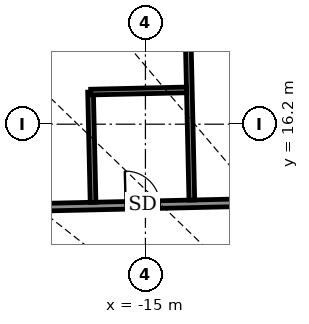
"""IFC4 building model, lengths in metres.
Left out: names, types, materials, properties, quantities, classifications, styles, units other than length and angle.
Written with IfcOpenShell. Run it as: python <this file> out.ifc"""

import sys

from ifc_helpers import new_model, si_unit, direction, frame, frame_2d, origin, place, context, subcontext, project, spatial, rectangle, extrude, element, fill, save


model = new_model("IFC4")
c1 = context("Model", 3, precision=1e-05, world=origin(), true_north=direction((0.0, 1.0)))
c2 = subcontext(c1, "Body", "Model", "MODEL_VIEW")
j1 = project(units=[si_unit("LENGTHUNIT", "METRE"), si_unit("PLANEANGLEUNIT", "RADIAN")], contexts=[c1])
p1 = place(None, origin())
s1 = spatial("IfcSite", under=j1, at=p1, CompositionType="ELEMENT")
p2 = place(p1, origin())
s2 = spatial("IfcBuilding", under=s1, at=p2, CompositionType="ELEMENT")
p3 = place(p2, frame((0.0, 0.0, 74.7)))
s3 = spatial("IfcBuildingStorey", under=s2, at=p3, CompositionType="ELEMENT", Elevation=74.7)
p4 = place(p3, frame((-25.525, 13.838, 0.0), z_axis=(0.0, 0.0, 1.0), x_axis=(0.999742549888, 0.022689952476, 0.0)))
e1 = element("IfcWall", 1, at=p4, inside=s3, PredefinedType="PARTITIONING", context=c2, shape_type="SweptSolid", body=[
    extrude(rectangle(XDim=53.778, YDim=0.2, at=frame_2d((26.889, 0.0))), origin(), (0.0, 0.0, 1.0), 2.25),
])
p5 = place(p4, frame((49.114, 0.0, 0.0)))
e2 = element("IfcOpeningElement", 2, at=p5, cuts=e1, PredefinedType="OPENING", context=c2, shape_type="SweptSolid", body=[
    extrude(rectangle(XDim=1.0, YDim=2.1, at=frame_2d((0.5, 1.05))), frame((0.0, 0.11, 0.0), z_axis=(0.0, -1.0, 0.0), x_axis=(1.0, 0.0, 0.0)), (0.0, 0.0, 1.0), 0.22),
])
p6 = place(p4, frame((40.781, 0.0, 0.0)))
e3 = element("IfcOpeningElement", 3, at=p6, cuts=e1, PredefinedType="OPENING", context=c2, shape_type="SweptSolid", body=[
    extrude(rectangle(XDim=0.9, YDim=2.1, at=frame_2d((0.45, 1.05))), frame((0.0, 0.11, 0.0), z_axis=(0.0, -1.0, 0.0), x_axis=(1.0, 0.0, 0.0)), (0.0, 0.0, 1.0), 0.22),
])
p7 = place(p4, frame((38.231, 0.0, 0.0)))
e4 = element("IfcOpeningElement", 4, at=p7, cuts=e1, PredefinedType="OPENING", context=c2, shape_type="SweptSolid", body=[
    extrude(rectangle(XDim=0.9, YDim=2.1, at=frame_2d((0.45, 1.05))), frame((0.0, 0.11, 0.0), z_axis=(0.0, -1.0, 0.0), x_axis=(1.0, 0.0, 0.0)), (0.0, 0.0, 1.0), 0.22),
])
p8 = place(p4, frame((30.881, 0.0, 0.0)))
e5 = element("IfcOpeningElement", 5, at=p8, cuts=e1, PredefinedType="OPENING", context=c2, shape_type="SweptSolid", body=[
    extrude(rectangle(XDim=0.9, YDim=2.1, at=frame_2d((0.45, 1.05))), frame((0.0, 0.11, 0.0), z_axis=(0.0, -1.0, 0.0), x_axis=(1.0, 0.0, 0.0)), (0.0, 0.0, 1.0), 0.22),
])
p9 = place(p4, frame((28.331, 0.0, 0.0)))
e6 = element("IfcOpeningElement", 6, at=p9, cuts=e1, PredefinedType="OPENING", context=c2, shape_type="SweptSolid", body=[
    extrude(rectangle(XDim=0.9, YDim=2.1, at=frame_2d((0.45, 1.05))), frame((0.0, 0.11, 0.0), z_axis=(0.0, -1.0, 0.0), x_axis=(1.0, 0.0, 0.0)), (0.0, 0.0, 1.0), 0.22),
])
p10 = place(p4, frame((20.406, 0.0, 0.0)))
e7 = element("IfcOpeningElement", 7, at=p10, cuts=e1, PredefinedType="OPENING", context=c2, shape_type="SweptSolid", body=[
    extrude(rectangle(XDim=1.0, YDim=2.1, at=frame_2d((0.5, 1.05))), frame((0.0, 0.11, 0.0), z_axis=(0.0, -1.0, 0.0), x_axis=(1.0, 0.0, 0.0)), (0.0, 0.0, 1.0), 0.22),
])
p11 = place(p4, frame((23.456, 0.0, 0.0)))
e8 = element("IfcOpeningElement", 8, at=p11, cuts=e1, PredefinedType="OPENING", context=c2, shape_type="SweptSolid", body=[
    extrude(rectangle(XDim=0.9, YDim=2.1, at=frame_2d((0.45, 1.05))), frame((0.0, 0.11, 0.0), z_axis=(0.0, -1.0, 0.0), x_axis=(1.0, 0.0, 0.0)), (0.0, 0.0, 1.0), 0.22),
])
p12 = place(p4, frame((14.931, 0.0, 0.0)))
e9 = element("IfcOpeningElement", 9, at=p12, cuts=e1, PredefinedType="OPENING", context=c2, shape_type="SweptSolid", body=[
    extrude(rectangle(XDim=1.0, YDim=2.1, at=frame_2d((0.5, 1.05))), frame((0.0, 0.11, 0.0), z_axis=(0.0, -1.0, 0.0), x_axis=(1.0, 0.0, 0.0)), (0.0, 0.0, 1.0), 0.22),
])
p13 = place(p4, frame((3.331, 0.0, 0.0)))
e10 = element("IfcOpeningElement", 10, at=p13, cuts=e1, PredefinedType="OPENING", context=c2, shape_type="SweptSolid", body=[
    extrude(rectangle(XDim=1.0, YDim=2.1, at=frame_2d((0.5, 1.05))), frame((0.0, 0.11, 0.0), z_axis=(0.0, -1.0, 0.0), x_axis=(1.0, 0.0, 0.0)), (0.0, 0.0, 1.0), 0.22),
])
p14 = place(p4, frame((10.006, 0.0, 0.0)))
e11 = element("IfcOpeningElement", 11, at=p14, cuts=e1, PredefinedType="OPENING", context=c2, shape_type="SweptSolid", body=[
    extrude(rectangle(XDim=0.9, YDim=2.1, at=frame_2d((0.45, 1.05))), frame((0.0, 0.11, 0.0), z_axis=(0.0, -1.0, 0.0), x_axis=(1.0, 0.0, 0.0)), (0.0, 0.0, 1.0), 0.22),
])
p15 = place(p3, frame((-16.378, 14.145, 0.0), z_axis=(0.0, 0.0, 1.0), x_axis=(-0.022809352981, 0.999739832865, 0.0)))
e12 = element("IfcWall", 12, at=p15, inside=s3, PredefinedType="PARTITIONING", context=c2, shape_type="SweptSolid", body=[
    extrude(rectangle(XDim=2.901, YDim=0.15, at=frame_2d((1.45, 0.0))), origin(), (0.0, 0.0, 1.0), 2.65),
])
p16 = place(p3, frame((-13.779, 14.204, 0.0), z_axis=(0.0, 0.0, 1.0), x_axis=(-0.022661475803, 0.999743195783, 0.0)))
e13 = element("IfcWall", 13, at=p16, inside=s3, PredefinedType="PARTITIONING", context=c2, shape_type="SweptSolid", body=[
    extrude(rectangle(XDim=12.4, YDim=0.15, at=frame_2d((6.2, 0.0))), origin(), (0.0, 0.0, 1.0), 2.45),
])
p17 = place(p3, frame((-16.44, 17.045, 0.0), z_axis=(0.0, 0.0, 1.0), x_axis=(0.99974392816, 0.022629142889, 0.0)))
e14 = element("IfcWall", 14, at=p17, inside=s3, PredefinedType="PARTITIONING", context=c2, shape_type="SweptSolid", body=[
    extrude(rectangle(XDim=2.525, YDim=0.15, at=frame_2d((1.262, 0.0))), origin(), (0.0, 0.0, 1.0), 2.45),
])
p18 = place(p14, origin())
e15 = element("IfcDoor", 15, at=p18, inside=s3, OperationType="SINGLE_SWING_RIGHT", PredefinedType="DOOR", context=c2, shape_type="SweptSolid", body=[
    extrude(rectangle(XDim=0.9, YDim=2.1, at=frame_2d((0.45, 1.05))), frame((0.0, 0.025, 0.0), z_axis=(0.0, -1.0, 0.0), x_axis=(1.0, 0.0, 0.0)), (0.0, 0.0, 1.0), 0.05),
])
fill(e11, e15)
save(model, sys.argv[1])
